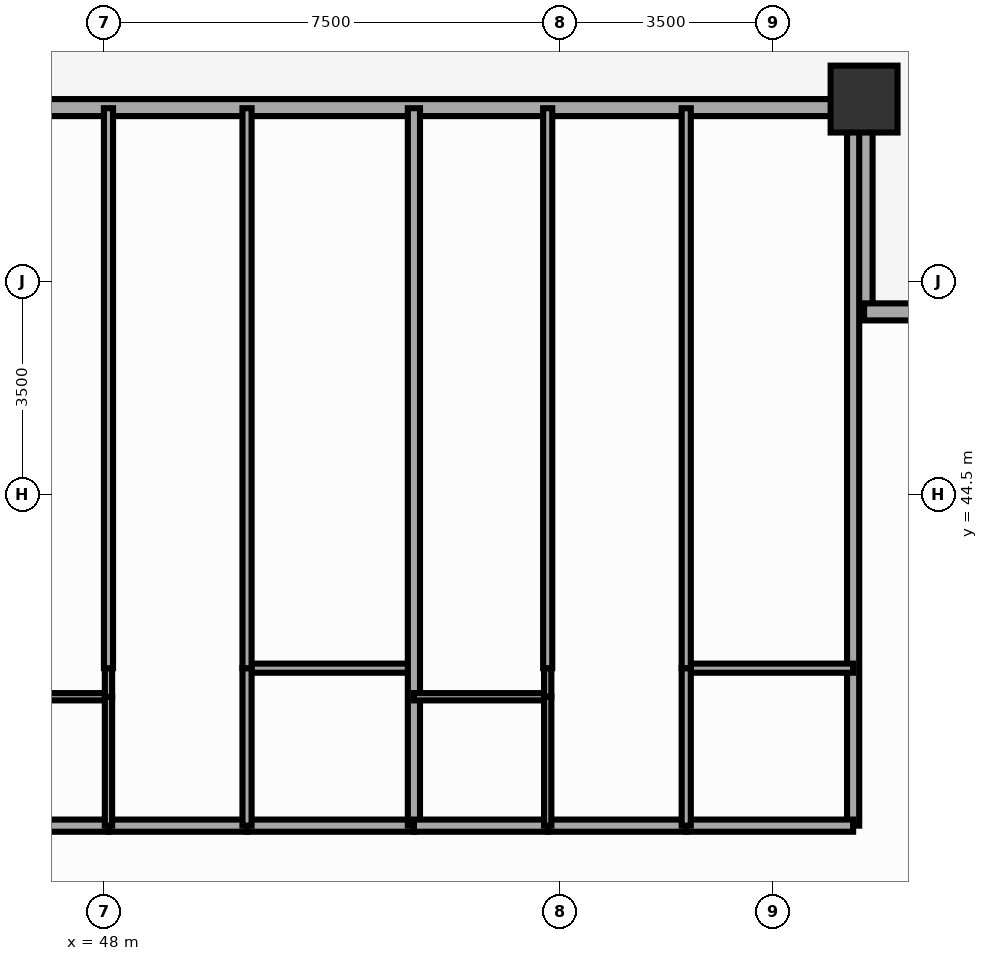
"""IFC4 building model, lengths in metres.
Left out: names, types, materials, properties, quantities, classifications, styles, units other than length and angle.
Written with IfcOpenShell. Run it as: python <this file> out.ifc"""

import sys

from ifc_helpers import new_model, si_unit, direction, frame, frame_2d, origin, origin_2d, place, context, subcontext, project, spatial, rectangle, extrude, source, transform, mapped, element, fill, save


model = new_model("IFC4")
c1 = context("Model", 3, precision=1e-05, world=origin(), true_north=direction((0.0, 1.0)))
c2 = subcontext(c1, "Body", "Model", "MODEL_VIEW")
j1 = project(units=[si_unit("LENGTHUNIT", "METRE"), si_unit("PLANEANGLEUNIT", "RADIAN")], contexts=[c1])
p1 = place(None, origin())
s1 = spatial("IfcSite", under=j1, at=p1, CompositionType="ELEMENT")
p2 = place(p1, origin())
s2 = spatial("IfcBuilding", under=s1, at=p2, CompositionType="ELEMENT")
p3 = place(p2, frame((0.0, 0.0, 19.4)))
s3 = spatial("IfcBuildingStorey", under=s2, at=p3, CompositionType="ELEMENT", Elevation=19.4)
m1 = source(origin(), c2, "Body", "SweptSolid", [
    extrude(rectangle(XDim=1.1, YDim=1.1, at=origin_2d()), origin(), (0.0, 0.0, 1.0), 3.0),
])
p4 = place(p3, frame((60.5, 51.0, 0.0), z_axis=(0.0, 0.0, 1.0), x_axis=(1.0, 0.0, 0.0)))
e1 = element("IfcColumn", 1, at=p4, inside=s3, PredefinedType="COLUMN", context=c2, shape_type="MappedRepresentation", body=[
    mapped(m1, transform((0.0, 0.0, 0.0), scale=1.0)),
])
p5 = place(p3, frame((15.5, 50.86, 0.0), z_axis=(0.0, 0.0, 1.0), x_axis=(1.0, 0.0, 0.0)))
e2 = element("IfcWall", 2, at=p5, inside=s3, PredefinedType="SOLIDWALL", context=c2, shape_type="SweptSolid", body=[
    extrude(rectangle(XDim=45.0, YDim=0.28, at=frame_2d((22.5, 0.0))), origin(), (0.0, 0.0, 1.0), 2.28),
])
p6 = place(p5, frame((0.76, 0.0, 0.25)))
e3 = element("IfcOpeningElement", 3, at=p6, cuts=e2, PredefinedType="OPENING", context=c2, shape_type="SweptSolid", body=[
    extrude(rectangle(XDim=1.2, YDim=1.5, at=frame_2d((0.6, 0.75))), frame((0.0, 0.152, 0.0), z_axis=(0.0, -1.0, 0.0), x_axis=(1.0, 0.0, 0.0)), (0.0, 0.0, 1.0), 0.304),
])
p7 = place(p5, frame((3.494, 0.0, 0.25)))
e4 = element("IfcOpeningElement", 4, at=p7, cuts=e2, PredefinedType="OPENING", context=c2, shape_type="SweptSolid", body=[
    extrude(rectangle(XDim=1.2, YDim=1.5, at=frame_2d((0.6, 0.75))), frame((0.0, 0.152, 0.0), z_axis=(0.0, -1.0, 0.0), x_axis=(1.0, 0.0, 0.0)), (0.0, 0.0, 1.0), 0.304),
])
p8 = place(p5, frame((8.741, 0.0, 0.25)))
e5 = element("IfcOpeningElement", 5, at=p8, cuts=e2, PredefinedType="OPENING", context=c2, shape_type="SweptSolid", body=[
    extrude(rectangle(XDim=1.2, YDim=1.5, at=frame_2d((0.6, 0.75))), frame((0.0, 0.152, 0.0), z_axis=(0.0, -1.0, 0.0), x_axis=(1.0, 0.0, 0.0)), (0.0, 0.0, 1.0), 0.304),
])
p9 = place(p5, frame((13.616, 0.0, 0.25)))
e6 = element("IfcOpeningElement", 6, at=p9, cuts=e2, PredefinedType="OPENING", context=c2, shape_type="SweptSolid", body=[
    extrude(rectangle(XDim=1.2, YDim=1.5, at=frame_2d((0.6, 0.75))), frame((0.0, 0.152, 0.0), z_axis=(0.0, -1.0, 0.0), x_axis=(1.0, 0.0, 0.0)), (0.0, 0.0, 1.0), 0.304),
])
p10 = place(p5, frame((17.146, 0.0, 0.25)))
e7 = element("IfcOpeningElement", 7, at=p10, cuts=e2, PredefinedType="OPENING", context=c2, shape_type="SweptSolid", body=[
    extrude(rectangle(XDim=1.2, YDim=1.5, at=frame_2d((0.6, 0.75))), frame((0.0, 0.152, 0.0), z_axis=(0.0, -1.0, 0.0), x_axis=(1.0, 0.0, 0.0)), (0.0, 0.0, 1.0), 0.304),
])
p11 = place(p5, frame((22.423, 0.0, 0.0)))
e8 = element("IfcOpeningElement", 8, at=p11, cuts=e2, PredefinedType="OPENING", context=c2, shape_type="SweptSolid", body=[
    extrude(rectangle(XDim=1.1, YDim=2.15, at=frame_2d((0.55, 1.075))), frame((0.0, 0.152, 0.0), z_axis=(0.0, -1.0, 0.0), x_axis=(1.0, 0.0, 0.0)), (0.0, 0.0, 1.0), 0.304),
])
p12 = place(p5, frame((27.252, 0.0, 0.25)))
e9 = element("IfcOpeningElement", 9, at=p12, cuts=e2, PredefinedType="OPENING", context=c2, shape_type="SweptSolid", body=[
    extrude(rectangle(XDim=0.95, YDim=1.5, at=frame_2d((0.475, 0.75))), frame((0.0, 0.152, 0.0), z_axis=(0.0, -1.0, 0.0), x_axis=(1.0, 0.0, 0.0)), (0.0, 0.0, 1.0), 0.304),
])
p13 = place(p5, frame((30.873, 0.0, 0.25)))
e10 = element("IfcOpeningElement", 10, at=p13, cuts=e2, PredefinedType="OPENING", context=c2, shape_type="SweptSolid", body=[
    extrude(rectangle(XDim=1.2, YDim=1.5, at=frame_2d((0.6, 0.75))), frame((0.0, 0.152, 0.0), z_axis=(0.0, -1.0, 0.0), x_axis=(1.0, 0.0, 0.0)), (0.0, 0.0, 1.0), 0.304),
])
p14 = place(p5, frame((33.113, 0.0, 0.25)))
e11 = element("IfcOpeningElement", 11, at=p14, cuts=e2, PredefinedType="OPENING", context=c2, shape_type="SweptSolid", body=[
    extrude(rectangle(XDim=1.2, YDim=1.5, at=frame_2d((0.6, 0.75))), frame((0.0, 0.152, 0.0), z_axis=(0.0, -1.0, 0.0), x_axis=(1.0, 0.0, 0.0)), (0.0, 0.0, 1.0), 0.304),
])
p15 = place(p5, frame((35.624, 0.0, 0.25)))
e12 = element("IfcOpeningElement", 12, at=p15, cuts=e2, PredefinedType="OPENING", context=c2, shape_type="SweptSolid", body=[
    extrude(rectangle(XDim=1.2, YDim=1.5, at=frame_2d((0.6, 0.75))), frame((0.0, 0.152, 0.0), z_axis=(0.0, -1.0, 0.0), x_axis=(1.0, 0.0, 0.0)), (0.0, 0.0, 1.0), 0.304),
])
p16 = place(p5, frame((38.097, 0.0, 0.25)))
e13 = element("IfcOpeningElement", 13, at=p16, cuts=e2, PredefinedType="OPENING", context=c2, shape_type="SweptSolid", body=[
    extrude(rectangle(XDim=1.2, YDim=1.5, at=frame_2d((0.6, 0.75))), frame((0.0, 0.152, 0.0), z_axis=(0.0, -1.0, 0.0), x_axis=(1.0, 0.0, 0.0)), (0.0, 0.0, 1.0), 0.304),
])
p17 = place(p5, frame((40.336, 0.0, 0.25)))
e14 = element("IfcOpeningElement", 14, at=p17, cuts=e2, PredefinedType="OPENING", context=c2, shape_type="SweptSolid", body=[
    extrude(rectangle(XDim=1.2, YDim=1.5, at=frame_2d((0.6, 0.75))), frame((0.0, 0.152, 0.0), z_axis=(0.0, -1.0, 0.0), x_axis=(1.0, 0.0, 0.0)), (0.0, 0.0, 1.0), 0.304),
])
p18 = place(p5, frame((42.743, 0.0, 0.25)))
e15 = element("IfcOpeningElement", 15, at=p18, cuts=e2, PredefinedType="OPENING", context=c2, shape_type="SweptSolid", body=[
    extrude(rectangle(XDim=1.2, YDim=1.5, at=frame_2d((0.6, 0.75))), frame((0.0, 0.152, 0.0), z_axis=(0.0, -1.0, 0.0), x_axis=(1.0, 0.0, 0.0)), (0.0, 0.0, 1.0), 0.304),
])
for number, where, z_axis, x_axis in (
    (16, (60.5, 47.5, 0.0), (0.0, 0.0, 1.0), (0.0, 1.0, 0.0)),
    (17, (60.5, 47.5, 0.0), (0.0, 0.0, 1.0), (1.0, 0.0, 0.0)),
):
    element("IfcWall", number, at=place(p3, frame(where, z_axis=z_axis, x_axis=x_axis)), inside=s3, PredefinedType="SOLIDWALL", context=c2, shape_type="SweptSolid", body=[
        extrude(rectangle(XDim=3.42, YDim=0.28, at=frame_2d((1.71, 0.0))), origin(), (0.0, 0.0, 1.0), 2.28),
    ])
p19 = place(p3, frame((60.32, 39.05, 0.0), z_axis=(0.0, 0.0, 1.0), x_axis=(0.0, 1.0, 0.0)))
e18 = element("IfcWall", 18, at=p19, inside=s3, PredefinedType="PARTITIONING", context=c2, shape_type="SweptSolid", body=[
    extrude(rectangle(XDim=11.8, YDim=0.2, at=frame_2d((5.9, 0.0))), origin(), (0.0, 0.0, 1.0), 2.79),
])
p20 = place(p3, frame((45.873, 39.05, 0.0), z_axis=(0.0, 0.0, 1.0), x_axis=(1.0, 0.0, 0.0)))
e19 = element("IfcWall", 19, at=p20, inside=s3, PredefinedType="PARTITIONING", context=c2, shape_type="SweptSolid", body=[
    extrude(rectangle(XDim=2.2, YDim=0.2, at=frame_2d((1.1, 0.0))), origin(), (0.0, 0.0, 1.0), 2.79),
])
p21 = place(p3, frame((48.073, 39.05, 0.0), z_axis=(0.0, 0.0, 1.0), x_axis=(1.0, 0.0, 0.0)))
e20 = element("IfcWall", 20, at=p21, inside=s3, PredefinedType="PARTITIONING", context=c2, shape_type="SweptSolid", body=[
    extrude(rectangle(XDim=2.278, YDim=0.2, at=frame_2d((1.139, 0.0))), origin(), (0.0, 0.0, 1.0), 2.79),
])
p22 = place(p21, frame((0.639, 0.0, 0.0)))
e21 = element("IfcOpeningElement", 21, at=p22, cuts=e20, PredefinedType="OPENING", context=c2, shape_type="SweptSolid", body=[
    extrude(rectangle(XDim=1.0, YDim=2.15, at=frame_2d((0.5, 1.075))), frame((0.0, 0.112, 0.0), z_axis=(0.0, -1.0, 0.0), x_axis=(1.0, 0.0, 0.0)), (0.0, 0.0, 1.0), 0.224),
])
p23 = place(p3, frame((50.352, 39.05, 0.0), z_axis=(0.0, 0.0, 1.0), x_axis=(1.0, 0.0, 0.0)))
e22 = element("IfcWall", 22, at=p23, inside=s3, PredefinedType="PARTITIONING", context=c2, shape_type="SweptSolid", body=[
    extrude(rectangle(XDim=2.745, YDim=0.2, at=frame_2d((1.373, 0.0))), origin(), (0.0, 0.0, 1.0), 2.79),
])
p24 = place(p3, frame((45.873, 41.17, 0.0), z_axis=(0.0, 0.0, 1.0), x_axis=(1.0, 0.0, 0.0)))
e23 = element("IfcWall", 23, at=p24, inside=s3, PredefinedType="PARTITIONING", context=c2, shape_type="SweptSolid", body=[
    extrude(rectangle(XDim=2.2, YDim=0.12, at=frame_2d((1.1, 0.0))), origin(), (0.0, 0.0, 1.0), 2.79),
])
p25 = place(p3, frame((50.352, 41.64, 0.0), z_axis=(0.0, 0.0, 1.0), x_axis=(1.0, 0.0, 0.0)))
e24 = element("IfcWall", 24, at=p25, inside=s3, PredefinedType="PARTITIONING", context=c2, shape_type="SweptSolid", body=[
    extrude(rectangle(XDim=2.745, YDim=0.15, at=frame_2d((1.373, 0.0))), origin(), (0.0, 0.0, 1.0), 2.79),
])
p26 = place(p3, frame((48.073, 39.05, 0.0), z_axis=(0.0, 0.0, 1.0), x_axis=(0.0, 1.0, 0.0)))
e25 = element("IfcWall", 25, at=p26, inside=s3, PredefinedType="PARTITIONING", context=c2, shape_type="SweptSolid", body=[
    extrude(rectangle(XDim=2.12, YDim=0.12, at=frame_2d((1.06, 0.0))), origin(), (0.0, 0.0, 1.0), 2.79),
])
p27 = place(p26, frame((0.635, 0.0, 0.0)))
e26 = element("IfcOpeningElement", 26, at=p27, cuts=e25, PredefinedType="OPENING", context=c2, shape_type="SweptSolid", body=[
    extrude(rectangle(XDim=0.85, YDim=2.05, at=frame_2d((0.425, 1.025))), frame((0.0, 0.072, 0.0), z_axis=(0.0, -1.0, 0.0), x_axis=(1.0, 0.0, 0.0)), (0.0, 0.0, 1.0), 0.144),
])
p28 = place(p3, frame((48.073, 41.17, 0.0), z_axis=(0.0, 0.0, 1.0), x_axis=(0.0, 1.0, 0.0)))
e27 = element("IfcWall", 27, at=p28, inside=s3, PredefinedType="PARTITIONING", context=c2, shape_type="SweptSolid", body=[
    extrude(rectangle(XDim=0.47, YDim=0.12, at=frame_2d((0.235, 0.0))), origin(), (0.0, 0.0, 1.0), 2.79),
])
p29 = place(p3, frame((48.073, 41.64, 0.0), z_axis=(0.0, 0.0, 1.0), x_axis=(0.0, 1.0, 0.0)))
e28 = element("IfcWall", 28, at=p29, inside=s3, PredefinedType="PARTITIONING", context=c2, shape_type="SweptSolid", body=[
    extrude(rectangle(XDim=9.21, YDim=0.15, at=frame_2d((4.605, 0.0))), origin(), (0.0, 0.0, 1.0), 2.79),
])
p30 = place(p29, frame((3.829, 0.0, 0.0)))
e29 = element("IfcOpeningElement", 29, at=p30, cuts=e28, PredefinedType="OPENING", context=c2, shape_type="SweptSolid", body=[
    extrude(rectangle(XDim=0.9, YDim=2.1, at=frame_2d((0.45, 1.05))), frame((0.0, 0.087, 0.0), z_axis=(0.0, -1.0, 0.0), x_axis=(1.0, 0.0, 0.0)), (0.0, 0.0, 1.0), 0.174),
])
p31 = place(p3, frame((50.352, 39.05, 0.0), z_axis=(0.0, 0.0, 1.0), x_axis=(0.0, 1.0, 0.0)))
e30 = element("IfcWall", 30, at=p31, inside=s3, PredefinedType="PARTITIONING", context=c2, shape_type="SweptSolid", body=[
    extrude(rectangle(XDim=2.59, YDim=0.15, at=frame_2d((1.295, 0.0))), origin(), (0.0, 0.0, 1.0), 2.79),
])
p32 = place(p31, frame((0.845, 0.0, 0.0)))
e31 = element("IfcOpeningElement", 31, at=p32, cuts=e30, PredefinedType="OPENING", context=c2, shape_type="SweptSolid", body=[
    extrude(rectangle(XDim=0.9, YDim=2.1, at=frame_2d((0.45, 1.05))), frame((0.0, 0.087, 0.0), z_axis=(0.0, -1.0, 0.0), x_axis=(1.0, 0.0, 0.0)), (0.0, 0.0, 1.0), 0.174),
])
p33 = place(p3, frame((50.352, 41.64, 0.0), z_axis=(0.0, 0.0, 1.0), x_axis=(0.0, 1.0, 0.0)))
e32 = element("IfcWall", 32, at=p33, inside=s3, PredefinedType="PARTITIONING", context=c2, shape_type="SweptSolid", body=[
    extrude(rectangle(XDim=9.21, YDim=0.15, at=frame_2d((4.605, 0.0))), origin(), (0.0, 0.0, 1.0), 2.79),
])
p34 = place(p33, frame((3.829, 0.0, 0.0)))
e33 = element("IfcOpeningElement", 33, at=p34, cuts=e32, PredefinedType="OPENING", context=c2, shape_type="SweptSolid", body=[
    extrude(rectangle(XDim=0.9, YDim=2.1, at=frame_2d((0.45, 1.05))), frame((0.0, 0.087, 0.0), z_axis=(0.0, -1.0, 0.0), x_axis=(1.0, 0.0, 0.0)), (0.0, 0.0, 1.0), 0.174),
])
p35 = place(p3, frame((53.097, 39.05, 0.0), z_axis=(0.0, 0.0, 1.0), x_axis=(0.0, 1.0, 0.0)))
e34 = element("IfcWall", 34, at=p35, inside=s3, PredefinedType="PARTITIONING", context=c2, shape_type="SweptSolid", body=[
    extrude(rectangle(XDim=11.8, YDim=0.2, at=frame_2d((5.9, 0.0))), origin(), (0.0, 0.0, 1.0), 2.79),
])
p36 = place(p3, frame((53.097, 39.05, 0.0), z_axis=(0.0, 0.0, 1.0), x_axis=(1.0, 0.0, 0.0)))
e35 = element("IfcWall", 35, at=p36, inside=s3, PredefinedType="PARTITIONING", context=c2, shape_type="SweptSolid", body=[
    extrude(rectangle(XDim=2.2, YDim=0.2, at=frame_2d((1.1, 0.0))), origin(), (0.0, 0.0, 1.0), 2.79),
])
p37 = place(p3, frame((55.297, 39.05, 0.0), z_axis=(0.0, 0.0, 1.0), x_axis=(1.0, 0.0, 0.0)))
e36 = element("IfcWall", 36, at=p37, inside=s3, PredefinedType="PARTITIONING", context=c2, shape_type="SweptSolid", body=[
    extrude(rectangle(XDim=2.279, YDim=0.2, at=frame_2d((1.139, 0.0))), origin(), (0.0, 0.0, 1.0), 2.79),
])
p38 = place(p37, frame((0.639, 0.0, 0.0)))
e37 = element("IfcOpeningElement", 37, at=p38, cuts=e36, PredefinedType="OPENING", context=c2, shape_type="SweptSolid", body=[
    extrude(rectangle(XDim=1.0, YDim=2.15, at=frame_2d((0.5, 1.075))), frame((0.0, 0.112, 0.0), z_axis=(0.0, -1.0, 0.0), x_axis=(1.0, 0.0, 0.0)), (0.0, 0.0, 1.0), 0.224),
])
p39 = place(p3, frame((57.575, 39.05, 0.0), z_axis=(0.0, 0.0, 1.0), x_axis=(1.0, 0.0, 0.0)))
e38 = element("IfcWall", 38, at=p39, inside=s3, PredefinedType="PARTITIONING", context=c2, shape_type="SweptSolid", body=[
    extrude(rectangle(XDim=2.745, YDim=0.2, at=frame_2d((1.373, 0.0))), origin(), (0.0, 0.0, 1.0), 2.79),
])
p40 = place(p3, frame((53.097, 41.17, 0.0), z_axis=(0.0, 0.0, 1.0), x_axis=(1.0, 0.0, 0.0)))
e39 = element("IfcWall", 39, at=p40, inside=s3, PredefinedType="PARTITIONING", context=c2, shape_type="SweptSolid", body=[
    extrude(rectangle(XDim=2.2, YDim=0.12, at=frame_2d((1.1, 0.0))), origin(), (0.0, 0.0, 1.0), 2.79),
])
p41 = place(p3, frame((57.575, 41.64, 0.0), z_axis=(0.0, 0.0, 1.0), x_axis=(1.0, 0.0, 0.0)))
e40 = element("IfcWall", 40, at=p41, inside=s3, PredefinedType="PARTITIONING", context=c2, shape_type="SweptSolid", body=[
    extrude(rectangle(XDim=2.745, YDim=0.15, at=frame_2d((1.373, 0.0))), origin(), (0.0, 0.0, 1.0), 2.79),
])
p42 = place(p3, frame((55.297, 39.05, 0.0), z_axis=(0.0, 0.0, 1.0), x_axis=(0.0, 1.0, 0.0)))
e41 = element("IfcWall", 41, at=p42, inside=s3, PredefinedType="PARTITIONING", context=c2, shape_type="SweptSolid", body=[
    extrude(rectangle(XDim=2.12, YDim=0.12, at=frame_2d((1.06, 0.0))), origin(), (0.0, 0.0, 1.0), 2.79),
])
p43 = place(p42, frame((0.635, 0.0, 0.0)))
e42 = element("IfcOpeningElement", 42, at=p43, cuts=e41, PredefinedType="OPENING", context=c2, shape_type="SweptSolid", body=[
    extrude(rectangle(XDim=0.85, YDim=2.05, at=frame_2d((0.425, 1.025))), frame((0.0, 0.072, 0.0), z_axis=(0.0, -1.0, 0.0), x_axis=(1.0, 0.0, 0.0)), (0.0, 0.0, 1.0), 0.144),
])
p44 = place(p3, frame((55.297, 41.17, 0.0), z_axis=(0.0, 0.0, 1.0), x_axis=(0.0, 1.0, 0.0)))
e43 = element("IfcWall", 43, at=p44, inside=s3, PredefinedType="PARTITIONING", context=c2, shape_type="SweptSolid", body=[
    extrude(rectangle(XDim=0.47, YDim=0.12, at=frame_2d((0.235, 0.0))), origin(), (0.0, 0.0, 1.0), 2.79),
])
p45 = place(p3, frame((55.297, 41.64, 0.0), z_axis=(0.0, 0.0, 1.0), x_axis=(0.0, 1.0, 0.0)))
e44 = element("IfcWall", 44, at=p45, inside=s3, PredefinedType="PARTITIONING", context=c2, shape_type="SweptSolid", body=[
    extrude(rectangle(XDim=9.21, YDim=0.15, at=frame_2d((4.605, 0.0))), origin(), (0.0, 0.0, 1.0), 2.79),
])
p46 = place(p45, frame((3.829, 0.0, 0.0)))
e45 = element("IfcOpeningElement", 45, at=p46, cuts=e44, PredefinedType="OPENING", context=c2, shape_type="SweptSolid", body=[
    extrude(rectangle(XDim=0.9, YDim=2.1, at=frame_2d((0.45, 1.05))), frame((0.0, 0.087, 0.0), z_axis=(0.0, -1.0, 0.0), x_axis=(1.0, 0.0, 0.0)), (0.0, 0.0, 1.0), 0.174),
])
p47 = place(p3, frame((57.575, 39.05, 0.0), z_axis=(0.0, 0.0, 1.0), x_axis=(0.0, 1.0, 0.0)))
e46 = element("IfcWall", 46, at=p47, inside=s3, PredefinedType="PARTITIONING", context=c2, shape_type="SweptSolid", body=[
    extrude(rectangle(XDim=2.59, YDim=0.15, at=frame_2d((1.295, 0.0))), origin(), (0.0, 0.0, 1.0), 2.79),
])
p48 = place(p47, frame((0.845, 0.0, 0.0)))
e47 = element("IfcOpeningElement", 47, at=p48, cuts=e46, PredefinedType="OPENING", context=c2, shape_type="SweptSolid", body=[
    extrude(rectangle(XDim=0.9, YDim=2.1, at=frame_2d((0.45, 1.05))), frame((0.0, 0.087, 0.0), z_axis=(0.0, -1.0, 0.0), x_axis=(1.0, 0.0, 0.0)), (0.0, 0.0, 1.0), 0.174),
])
p49 = place(p3, frame((57.575, 41.64, 0.0), z_axis=(0.0, 0.0, 1.0), x_axis=(0.0, 1.0, 0.0)))
e48 = element("IfcWall", 48, at=p49, inside=s3, PredefinedType="PARTITIONING", context=c2, shape_type="SweptSolid", body=[
    extrude(rectangle(XDim=9.21, YDim=0.15, at=frame_2d((4.605, 0.0))), origin(), (0.0, 0.0, 1.0), 2.79),
])
p50 = place(p49, frame((3.829, 0.0, 0.0)))
e49 = element("IfcOpeningElement", 49, at=p50, cuts=e48, PredefinedType="OPENING", context=c2, shape_type="SweptSolid", body=[
    extrude(rectangle(XDim=0.9, YDim=2.1, at=frame_2d((0.45, 1.05))), frame((0.0, 0.087, 0.0), z_axis=(0.0, -1.0, 0.0), x_axis=(1.0, 0.0, 0.0)), (0.0, 0.0, 1.0), 0.174),
])
m2 = source(origin(), c2, "Body", "SweptSolid", [
    extrude(rectangle(XDim=1.2, YDim=1.5, at=frame_2d((0.6, 0.75))), frame((0.0, 0.03, 0.0), z_axis=(0.0, -1.0, 0.0), x_axis=(1.0, 0.0, 0.0)), (0.0, 0.0, 1.0), 0.06),
])
p51 = place(p13, origin())
e50 = element("IfcWindow", 50, at=p51, inside=s3, PartitioningType="SINGLE_PANEL", PredefinedType="WINDOW", context=c2, shape_type="MappedRepresentation", body=[
    mapped(m2, transform((0.0, 0.0, 0.0), scale=1.0)),
])
fill(e10, e50)
p52 = place(p14, origin())
e51 = element("IfcWindow", 51, at=p52, inside=s3, PartitioningType="SINGLE_PANEL", PredefinedType="WINDOW", context=c2, shape_type="MappedRepresentation", body=[
    mapped(m2, transform((0.0, 0.0, 0.0), scale=1.0)),
])
fill(e11, e51)
p53 = place(p15, origin())
e52 = element("IfcWindow", 52, at=p53, inside=s3, PartitioningType="SINGLE_PANEL", PredefinedType="WINDOW", context=c2, shape_type="MappedRepresentation", body=[
    mapped(m2, transform((0.0, 0.0, 0.0), scale=1.0)),
])
fill(e12, e52)
p54 = place(p16, origin())
e53 = element("IfcWindow", 53, at=p54, inside=s3, PartitioningType="SINGLE_PANEL", PredefinedType="WINDOW", context=c2, shape_type="MappedRepresentation", body=[
    mapped(m2, transform((0.0, 0.0, 0.0), scale=1.0)),
])
fill(e13, e53)
p55 = place(p17, origin())
e54 = element("IfcWindow", 54, at=p55, inside=s3, PartitioningType="SINGLE_PANEL", PredefinedType="WINDOW", context=c2, shape_type="MappedRepresentation", body=[
    mapped(m2, transform((0.0, 0.0, 0.0), scale=1.0)),
])
fill(e14, e54)
p56 = place(p18, origin())
e55 = element("IfcWindow", 55, at=p56, inside=s3, PartitioningType="SINGLE_PANEL", PredefinedType="WINDOW", context=c2, shape_type="MappedRepresentation", body=[
    mapped(m2, transform((0.0, 0.0, 0.0), scale=1.0)),
])
fill(e15, e55)
m3 = source(origin(), c2, "Body", "SweptSolid", [
    extrude(rectangle(XDim=1.0, YDim=2.15, at=frame_2d((0.5, 1.075))), frame((0.0, 0.025, 0.0), z_axis=(0.0, -1.0, 0.0), x_axis=(1.0, 0.0, 0.0)), (0.0, 0.0, 1.0), 0.05),
])
p57 = place(p22, origin())
e56 = element("IfcDoor", 56, at=p57, inside=s3, OperationType="SINGLE_SWING_RIGHT", PredefinedType="DOOR", context=c2, shape_type="MappedRepresentation", body=[
    mapped(m3, transform((0.0, 0.0, 0.0), scale=1.0)),
])
fill(e21, e56)
m4 = source(origin(), c2, "Body", "SweptSolid", [
    extrude(rectangle(XDim=0.85, YDim=2.05, at=frame_2d((0.425, 1.025))), frame((0.0, 0.025, 0.0), z_axis=(0.0, -1.0, 0.0), x_axis=(1.0, 0.0, 0.0)), (0.0, 0.0, 1.0), 0.05),
])
p58 = place(p27, origin())
e57 = element("IfcDoor", 57, at=p58, inside=s3, OperationType="SINGLE_SWING_LEFT", PredefinedType="DOOR", context=c2, shape_type="MappedRepresentation", body=[
    mapped(m4, transform((0.0, 0.0, 0.0), scale=1.0)),
])
fill(e26, e57)
m5 = source(origin(), c2, "Body", "SweptSolid", [
    extrude(rectangle(XDim=0.9, YDim=2.1, at=frame_2d((0.45, 1.05))), frame((0.0, 0.025, 0.0), z_axis=(0.0, -1.0, 0.0), x_axis=(1.0, 0.0, 0.0)), (0.0, 0.0, 1.0), 0.05),
])
p59 = place(p30, origin())
e58 = element("IfcDoor", 58, at=p59, inside=s3, OperationType="SINGLE_SWING_RIGHT", PredefinedType="DOOR", context=c2, shape_type="MappedRepresentation", body=[
    mapped(m5, transform((0.0, 0.0, 0.0), scale=1.0)),
])
fill(e29, e58)
p60 = place(p32, origin())
e59 = element("IfcDoor", 59, at=p60, inside=s3, OperationType="SINGLE_SWING_LEFT", PredefinedType="DOOR", context=c2, shape_type="MappedRepresentation", body=[
    mapped(m5, transform((0.0, 0.0, 0.0), scale=1.0)),
])
fill(e31, e59)
p61 = place(p34, origin())
e60 = element("IfcDoor", 60, at=p61, inside=s3, OperationType="SINGLE_SWING_RIGHT", PredefinedType="DOOR", context=c2, shape_type="MappedRepresentation", body=[
    mapped(m5, transform((0.0, 0.0, 0.0), scale=1.0)),
])
fill(e33, e60)
p62 = place(p38, origin())
e61 = element("IfcDoor", 61, at=p62, inside=s3, OperationType="SINGLE_SWING_LEFT", PredefinedType="DOOR", context=c2, shape_type="MappedRepresentation", body=[
    mapped(m3, transform((0.0, 0.0, 0.0), scale=1.0)),
])
fill(e37, e61)
p63 = place(p43, origin())
e62 = element("IfcDoor", 62, at=p63, inside=s3, OperationType="SINGLE_SWING_RIGHT", PredefinedType="DOOR", context=c2, shape_type="MappedRepresentation", body=[
    mapped(m4, transform((0.0, 0.0, 0.0), scale=1.0)),
])
fill(e42, e62)
p64 = place(p46, origin())
e63 = element("IfcDoor", 63, at=p64, inside=s3, OperationType="SINGLE_SWING_LEFT", PredefinedType="DOOR", context=c2, shape_type="MappedRepresentation", body=[
    mapped(m5, transform((0.0, 0.0, 0.0), scale=1.0)),
])
fill(e45, e63)
p65 = place(p48, origin())
e64 = element("IfcDoor", 64, at=p65, inside=s3, OperationType="SINGLE_SWING_RIGHT", PredefinedType="DOOR", context=c2, shape_type="MappedRepresentation", body=[
    mapped(m5, transform((0.0, 0.0, 0.0), scale=1.0)),
])
fill(e47, e64)
p66 = place(p50, origin())
e65 = element("IfcDoor", 65, at=p66, inside=s3, OperationType="SINGLE_SWING_LEFT", PredefinedType="DOOR", context=c2, shape_type="MappedRepresentation", body=[
    mapped(m5, transform((0.0, 0.0, 0.0), scale=1.0)),
])
fill(e49, e65)
save(model, sys.argv[1])
